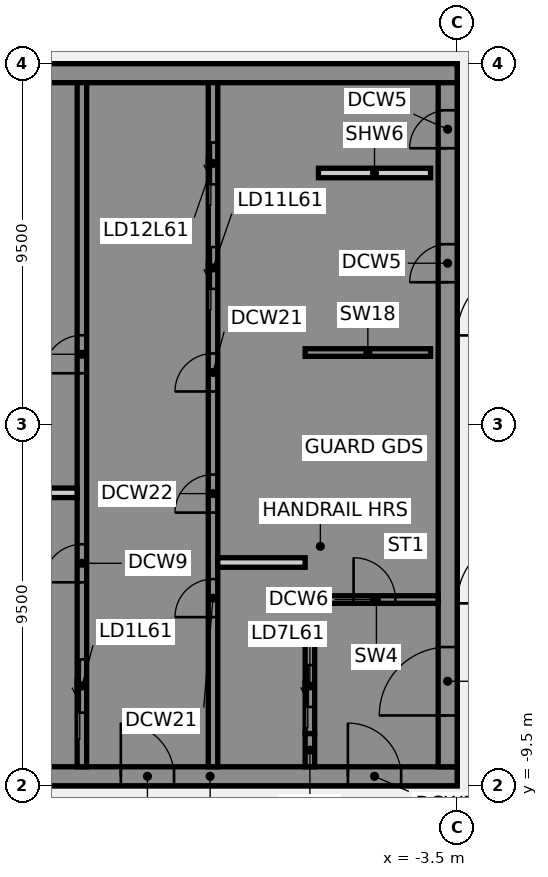
"""IFC4 building model, lengths in metres.
Left out: names, types, materials, properties, quantities, classifications, styles, units other than length and angle.
Written with IfcOpenShell. Run it as: python <this file> out.ifc"""

import sys

from ifc_helpers import new_model, si_unit, direction, frame, frame_2d, origin, place, context, subcontext, project, spatial, polyline, rectangle, outline, extrude, element, fill, save


model = new_model("IFC4")
c1 = context("Model", 3, precision=1e-05, world=origin(), true_north=direction((0.0, 1.0)))
c2 = subcontext(c1, "Body", "Model", "MODEL_VIEW")
j1 = project(units=[si_unit("LENGTHUNIT", "METRE"), si_unit("PLANEANGLEUNIT", "RADIAN")], contexts=[c1])
p1 = place(None, origin())
s1 = spatial("IfcSite", under=j1, at=p1, CompositionType="ELEMENT")
p2 = place(p1, origin())
s2 = spatial("IfcBuilding", under=s1, at=p2, CompositionType="ELEMENT")
p3 = place(p2, frame((0.0, 0.0, 241.5)))
s3 = spatial("IfcBuildingStorey", under=s2, at=p3, CompositionType="ELEMENT", Elevation=241.5)
p4 = place(p3, frame((-16.5, -9.25, 0.0), z_axis=(0.0, 0.0, 1.0), x_axis=(1.0, 0.0, 0.0)))
e1 = element("IfcWall", 1, at=p4, inside=s3, PredefinedType="SHEAR", context=c2, shape_type="SweptSolid", body=[
    extrude(rectangle(XDim=13.0, YDim=0.5, at=frame_2d((6.5, 0.0))), origin(), (0.0, 0.0, 1.0), 3.46),
])
p5 = place(p4, frame((4.15, 0.0, 0.0)))
e2 = element("IfcOpeningElement", 2, at=p5, cuts=e1, PredefinedType="OPENING", context=c2, shape_type="SweptSolid", body=[
    extrude(rectangle(XDim=1.4, YDim=2.1, at=frame_2d((0.7, 1.05))), frame((0.0, 0.26, 0.0), z_axis=(0.0, -1.0, 0.0), x_axis=(1.0, 0.0, 0.0)), (0.0, 0.0, 1.0), 0.52),
])
p6 = place(p4, frame((10.125, 0.0, 0.0)))
e3 = element("IfcOpeningElement", 3, at=p6, cuts=e1, PredefinedType="OPENING", context=c2, shape_type="SweptSolid", body=[
    extrude(rectangle(XDim=1.4, YDim=2.1, at=frame_2d((0.7, 1.05))), frame((0.0, 0.26, 0.0), z_axis=(0.0, -1.0, 0.0), x_axis=(1.0, 0.0, 0.0)), (0.0, 0.0, 1.0), 0.52),
])
p7 = place(p3, origin())
e4 = element("IfcWall", 4, at=p7, inside=s3, PredefinedType="SHEAR", context=c2, shape_type="SweptSolid", body=[
    extrude(outline(polyline([(-13.5, -8.125), (-16.0, -8.125), (-16.0, -5.625), (-13.5, -5.625), (-13.5, -5.375), (-16.0, -5.375), (-16.0, 5.375), (-13.5, 5.375), (-13.5, 5.625), (-16.0, 5.625), (-16.0, 8.125), (-13.5, 8.125), (-13.5, 9.0), (-16.0, 9.0), (-16.5, 9.0), (-16.5, -9.0), (-16.0, -9.0), (-13.5, -9.0), (-13.5, -8.125)])), origin(), (0.0, 0.0, 1.0), 3.46),
])
p8 = place(p3, frame((-16.5, 9.25, 0.0), z_axis=(0.0, 0.0, 1.0), x_axis=(1.0, 0.0, 0.0)))
e5 = element("IfcWall", 5, at=p8, inside=s3, PredefinedType="SHEAR", context=c2, shape_type="SweptSolid", body=[
    extrude(rectangle(XDim=13.0, YDim=0.5, at=frame_2d((6.5, 0.0))), origin(), (0.0, 0.0, 1.0), 3.46),
])
p9 = place(p3, origin())
e6 = element("IfcWall", 6, at=p9, inside=s3, PredefinedType="SHEAR", context=c2, shape_type="SweptSolid", body=[
    extrude(outline(polyline([(-9.8, -5.375), (-9.8, -5.625), (-7.5, -5.625), (-7.25, -5.625), (-7.25, 9.0), (-7.5, 9.0), (-9.8, 9.0), (-9.8, 8.125), (-7.5, 8.125), (-7.5, 5.625), (-9.8, 5.625), (-9.8, 5.375), (-7.5, 5.375), (-7.5, 2.875), (-9.8, 2.875), (-9.8, 2.625), (-7.5, 2.625), (-7.5, -5.375), (-9.8, -5.375)])), origin(), (0.0, 0.0, 1.0), 3.46),
])
p10 = place(p3, origin())
e7 = element("IfcWall", 7, at=p10, inside=s3, PredefinedType="SHEAR", context=c2, shape_type="SweptSolid", body=[
    extrude(outline(polyline([(-7.5, -8.125), (-9.55, -8.125), (-9.55, -5.625), (-9.8, -5.625), (-9.8, -8.125), (-9.8, -9.0), (-7.5, -9.0), (-7.5, -8.125)])), origin(), (0.0, 0.0, 1.0), 3.46),
])
p11 = place(p3, frame((-7.375, -9.0, 0.0), z_axis=(0.0, 0.0, 1.0), x_axis=(0.0, 1.0, 0.0)))
e8 = element("IfcWall", 8, at=p11, inside=s3, PredefinedType="SHEAR", context=c2, shape_type="SweptSolid", body=[
    extrude(rectangle(XDim=0.875, YDim=0.25, at=frame_2d((0.438, 0.0))), origin(), (0.0, 0.0, 1.0), 3.46),
])
p12 = place(p3, frame((-7.5, 1.9, 0.0), z_axis=(0.0, 0.0, 1.0), x_axis=(1.0, 0.0, 0.0)))
e9 = element("IfcWall", 9, at=p12, inside=s3, PredefinedType="SHEAR", context=c2, shape_type="SweptSolid", body=[
    extrude(rectangle(XDim=3.3, YDim=0.2, at=frame_2d((1.65, 0.0))), origin(), (0.0, 0.0, 1.0), 3.46),
])
p13 = place(p3, frame((-13.375, -9.0, 0.0), z_axis=(0.0, 0.0, 1.0), x_axis=(0.0, 1.0, 0.0)))
e10 = element("IfcWall", 10, at=p13, inside=s3, PredefinedType="SHEAR", context=c2, shape_type="SweptSolid", body=[
    extrude(rectangle(XDim=18.0, YDim=0.25, at=frame_2d((9.0, 0.0))), origin(), (0.0, 0.0, 1.0), 3.46),
])
p14 = place(p13, frame((1.425, 0.0, 0.0)))
e11 = element("IfcOpeningElement", 11, at=p14, cuts=e10, PredefinedType="OPENING", context=c2, shape_type="SweptSolid", body=[
    extrude(rectangle(XDim=1.4, YDim=2.1, at=frame_2d((0.7, 1.05))), frame((0.0, 0.135, 0.0), z_axis=(0.0, -1.0, 0.0), x_axis=(1.0, 0.0, 0.0)), (0.0, 0.0, 1.0), 0.27),
])
p15 = place(p13, frame((4.854, 0.0, 0.0)))
e12 = element("IfcOpeningElement", 12, at=p15, cuts=e10, PredefinedType="OPENING", context=c2, shape_type="SweptSolid", body=[
    extrude(rectangle(XDim=1.0, YDim=2.1, at=frame_2d((0.5, 1.05))), frame((0.0, 0.135, 0.0), z_axis=(0.0, -1.0, 0.0), x_axis=(1.0, 0.0, 0.0)), (0.0, 0.0, 1.0), 0.27),
])
p16 = place(p13, frame((10.354, 0.0, 0.0)))
e13 = element("IfcOpeningElement", 13, at=p16, cuts=e10, PredefinedType="OPENING", context=c2, shape_type="SweptSolid", body=[
    extrude(rectangle(XDim=1.0, YDim=2.1, at=frame_2d((0.5, 1.05))), frame((0.0, 0.135, 0.0), z_axis=(0.0, -1.0, 0.0), x_axis=(1.0, 0.0, 0.0)), (0.0, 0.0, 1.0), 0.27),
])
p17 = place(p3, frame((-9.925, -9.0, 0.0), z_axis=(0.0, 0.0, 1.0), x_axis=(0.0, 1.0, 0.0)))
e14 = element("IfcWall", 14, at=p17, inside=s3, PredefinedType="SHEAR", context=c2, shape_type="SweptSolid", body=[
    extrude(rectangle(XDim=18.0, YDim=0.25, at=frame_2d((9.0, 0.0))), origin(), (0.0, 0.0, 1.0), 3.46),
])
p18 = place(p17, frame((12.575, 0.0, 0.0)))
e15 = element("IfcOpeningElement", 15, at=p18, cuts=e14, PredefinedType="OPENING", context=c2, shape_type="SweptSolid", body=[
    extrude(rectangle(XDim=1.1, YDim=2.1, at=frame_2d((0.55, 1.05))), frame((0.0, 0.135, 0.0), z_axis=(0.0, -1.0, 0.0), x_axis=(1.0, 0.0, 0.0)), (0.0, 0.0, 1.0), 0.27),
])
p19 = place(p17, frame((15.325, 0.0, 0.0)))
e16 = element("IfcOpeningElement", 16, at=p19, cuts=e14, PredefinedType="OPENING", context=c2, shape_type="SweptSolid", body=[
    extrude(rectangle(XDim=1.1, YDim=2.1, at=frame_2d((0.55, 1.05))), frame((0.0, 0.135, 0.0), z_axis=(0.0, -1.0, 0.0), x_axis=(1.0, 0.0, 0.0)), (0.0, 0.0, 1.0), 0.27),
])
p20 = place(p17, frame((3.938, 0.0, 0.0)))
e17 = element("IfcOpeningElement", 17, at=p20, cuts=e14, PredefinedType="OPENING", context=c2, shape_type="SweptSolid", body=[
    extrude(rectangle(XDim=1.0, YDim=2.1, at=frame_2d((0.5, 1.05))), frame((0.0, 0.135, 0.0), z_axis=(0.0, -1.0, 0.0), x_axis=(1.0, 0.0, 0.0)), (0.0, 0.0, 1.0), 0.27),
])
p21 = place(p17, frame((6.688, 0.0, 0.0)))
e18 = element("IfcOpeningElement", 18, at=p21, cuts=e14, PredefinedType="OPENING", context=c2, shape_type="SweptSolid", body=[
    extrude(rectangle(XDim=1.0, YDim=2.1, at=frame_2d((0.5, 1.05))), frame((0.0, 0.135, 0.0), z_axis=(0.0, -1.0, 0.0), x_axis=(1.0, 0.0, 0.0)), (0.0, 0.0, 1.0), 0.27),
])
p22 = place(p17, frame((9.875, 0.0, 0.0)))
e19 = element("IfcOpeningElement", 19, at=p22, cuts=e14, PredefinedType="OPENING", context=c2, shape_type="SweptSolid", body=[
    extrude(rectangle(XDim=1.0, YDim=2.1, at=frame_2d((0.5, 1.05))), frame((0.0, 0.135, 0.0), z_axis=(0.0, -1.0, 0.0), x_axis=(1.0, 0.0, 0.0)), (0.0, 0.0, 1.0), 0.27),
])
p23 = place(p3, frame((-7.375, -8.125, 0.0), z_axis=(0.0, 0.0, 1.0), x_axis=(0.0, 1.0, 0.0)))
e20 = element("IfcWall", 20, at=p23, inside=s3, PredefinedType="SHEAR", context=c2, shape_type="SweptSolid", body=[
    extrude(rectangle(XDim=2.5, YDim=0.25, at=frame_2d((1.25, 0.0))), origin(), (0.0, 0.0, 1.0), 3.46),
])
p24 = place(p23, frame((0.7, 0.0, 0.0)))
e21 = element("IfcOpeningElement", 21, at=p24, cuts=e20, PredefinedType="OPENING", context=c2, shape_type="SweptSolid", body=[
    extrude(rectangle(XDim=1.1, YDim=2.1, at=frame_2d((0.55, 1.05))), frame((0.0, 0.135, 0.0), z_axis=(0.0, -1.0, 0.0), x_axis=(1.0, 0.0, 0.0)), (0.0, 0.0, 1.0), 0.27),
])
p25 = place(p3, frame((-3.75, -9.0, 0.0), z_axis=(0.0, 0.0, 1.0), x_axis=(0.0, 1.0, 0.0)))
e22 = element("IfcWall", 22, at=p25, inside=s3, PredefinedType="SHEAR", context=c2, shape_type="SweptSolid", body=[
    extrude(rectangle(XDim=18.0, YDim=0.5, at=frame_2d((9.0, 0.0))), origin(), (0.0, 0.0, 1.0), 3.46),
])
p26 = place(p25, frame((1.35, 0.0, 0.0)))
e23 = element("IfcOpeningElement", 23, at=p26, cuts=e22, PredefinedType="OPENING", context=c2, shape_type="SweptSolid", body=[
    extrude(rectangle(XDim=1.8, YDim=2.1, at=frame_2d((0.9, 1.05))), frame((0.0, 0.26, 0.0), z_axis=(0.0, -1.0, 0.0), x_axis=(1.0, 0.0, 0.0)), (0.0, 0.0, 1.0), 0.52),
])
p27 = place(p25, frame((12.75, 0.0, 0.0)))
e24 = element("IfcOpeningElement", 24, at=p27, cuts=e22, PredefinedType="OPENING", context=c2, shape_type="SweptSolid", body=[
    extrude(rectangle(XDim=1.0, YDim=2.1, at=frame_2d((0.5, 1.05))), frame((0.0, 0.26, 0.0), z_axis=(0.0, -1.0, 0.0), x_axis=(1.0, 0.0, 0.0)), (0.0, 0.0, 1.0), 0.52),
])
p28 = place(p25, frame((16.274, 0.0, 0.0)))
e25 = element("IfcOpeningElement", 25, at=p28, cuts=e22, PredefinedType="OPENING", context=c2, shape_type="SweptSolid", body=[
    extrude(rectangle(XDim=1.0, YDim=2.1, at=frame_2d((0.5, 1.05))), frame((0.0, 0.26, 0.0), z_axis=(0.0, -1.0, 0.0), x_axis=(1.0, 0.0, 0.0)), (0.0, 0.0, 1.0), 0.52),
])
p29 = place(p3, frame((-7.15, 6.624, 0.0), z_axis=(0.0, 0.0, 1.0), x_axis=(1.0, 0.0, 0.0)))
e26 = element("IfcWall", 26, at=p29, inside=s3, PredefinedType="PARTITIONING", context=c2, shape_type="SweptSolid", body=[
    extrude(rectangle(XDim=2.95, YDim=0.25, at=frame_2d((1.475, 0.0))), origin(), (0.0, 0.0, 1.0), 3.46),
])
p30 = place(p3, frame((-7.25, -4.6, 0.0), z_axis=(0.0, 0.0, 1.0), x_axis=(1.0, 0.0, 0.0)))
e27 = element("IfcWall", 27, at=p30, inside=s3, PredefinedType="SHEAR", context=c2, shape_type="SweptSolid", body=[
    extrude(rectangle(XDim=3.25, YDim=0.2, at=frame_2d((1.625, 0.0))), origin(), (0.0, 0.0, 1.0), 3.46),
])
p31 = place(p30, frame((1.025, 0.0, 0.0)))
e28 = element("IfcOpeningElement", 28, at=p31, cuts=e27, PredefinedType="OPENING", context=c2, shape_type="SweptSolid", body=[
    extrude(rectangle(XDim=1.1, YDim=2.1, at=frame_2d((0.55, 1.05))), frame((0.0, 0.11, 0.0), z_axis=(0.0, -1.0, 0.0), x_axis=(1.0, 0.0, 0.0)), (0.0, 0.0, 1.0), 0.22),
])
for number, where, z_axis, x_axis in (
    (29, (-15.8, -1.792, 0.0), (0.0, 0.0, 1.0), (1.0, 0.0, 0.0)),
    (30, (-9.8, -3.625, 0.0), (0.0, 0.0, 1.0), (1.0, 0.0, 0.0)),
):
    element("IfcWall", number, at=place(p3, frame(where, z_axis=z_axis, x_axis=x_axis)), inside=s3, PredefinedType="PARTITIONING", context=c2, shape_type="SweptSolid", body=[
        extrude(rectangle(XDim=2.3, YDim=0.25, at=frame_2d((1.15, 0.0))), origin(), (0.0, 0.0, 1.0), 3.46),
    ])
p32 = place(p5, origin())
e31 = element("IfcDoor", 31, at=p32, inside=s3, OperationType="SINGLE_SWING_LEFT", PredefinedType="DOOR", context=c2, shape_type="SweptSolid", body=[
    extrude(rectangle(XDim=1.4, YDim=2.1, at=frame_2d((0.7, 1.05))), frame((0.0, 0.025, 0.0), z_axis=(0.0, -1.0, 0.0), x_axis=(1.0, 0.0, 0.0)), (0.0, 0.0, 1.0), 0.05),
])
fill(e2, e31)
p33 = place(p6, origin())
e32 = element("IfcDoor", 32, at=p33, inside=s3, OperationType="SINGLE_SWING_LEFT", PredefinedType="DOOR", context=c2, shape_type="SweptSolid", body=[
    extrude(rectangle(XDim=1.4, YDim=2.1, at=frame_2d((0.7, 1.05))), frame((0.0, 0.025, 0.0), z_axis=(0.0, -1.0, 0.0), x_axis=(1.0, 0.0, 0.0)), (0.0, 0.0, 1.0), 0.05),
])
fill(e3, e32)
p34 = place(p26, origin())
e33 = element("IfcDoor", 33, at=p34, inside=s3, OperationType="SINGLE_SWING_LEFT", PredefinedType="DOOR", context=c2, shape_type="SweptSolid", body=[
    extrude(rectangle(XDim=1.8, YDim=2.1, at=frame_2d((0.9, 1.05))), frame((0.0, 0.025, 0.0), z_axis=(0.0, -1.0, 0.0), x_axis=(1.0, 0.0, 0.0)), (0.0, 0.0, 1.0), 0.05),
])
fill(e23, e33)
p35 = place(p27, origin())
e34 = element("IfcDoor", 34, at=p35, inside=s3, OperationType="SINGLE_SWING_LEFT", PredefinedType="DOOR", context=c2, shape_type="SweptSolid", body=[
    extrude(rectangle(XDim=1.0, YDim=2.1, at=frame_2d((0.5, 1.05))), frame((0.0, 0.225, 0.0), z_axis=(0.0, -1.0, 0.0), x_axis=(1.0, 0.0, 0.0)), (0.0, 0.0, 1.0), 0.05),
])
fill(e24, e34)
p36 = place(p28, origin())
e35 = element("IfcDoor", 35, at=p36, inside=s3, OperationType="SINGLE_SWING_LEFT", PredefinedType="DOOR", context=c2, shape_type="SweptSolid", body=[
    extrude(rectangle(XDim=1.0, YDim=2.1, at=frame_2d((0.5, 1.05))), frame((0.0, 0.225, 0.0), z_axis=(0.0, -1.0, 0.0), x_axis=(1.0, 0.0, 0.0)), (0.0, 0.0, 1.0), 0.05),
])
fill(e25, e35)
p37 = place(p31, origin())
e36 = element("IfcDoor", 36, at=p37, inside=s3, OperationType="SINGLE_SWING_LEFT", PredefinedType="DOOR", context=c2, shape_type="SweptSolid", body=[
    extrude(rectangle(XDim=1.1, YDim=2.1, at=frame_2d((0.55, 1.05))), frame((0.0, 0.025, 0.0), z_axis=(0.0, -1.0, 0.0), x_axis=(1.0, 0.0, 0.0)), (0.0, 0.0, 1.0), 0.05),
])
fill(e28, e36)
p38 = place(p14, origin())
e37 = element("IfcDoor", 37, at=p38, inside=s3, OperationType="SLIDING_TO_LEFT", PredefinedType="DOOR", context=c2, shape_type="SweptSolid", body=[
    extrude(rectangle(XDim=1.4, YDim=2.1, at=frame_2d((0.7, 1.05))), frame((0.0, 0.025, 0.0), z_axis=(0.0, -1.0, 0.0), x_axis=(1.0, 0.0, 0.0)), (0.0, 0.0, 1.0), 0.05),
])
fill(e11, e37)
p39 = place(p24, origin())
e38 = element("IfcDoor", 38, at=p39, inside=s3, OperationType="SLIDING_TO_LEFT", PredefinedType="DOOR", context=c2, shape_type="SweptSolid", body=[
    extrude(rectangle(XDim=1.1, YDim=2.1, at=frame_2d((0.55, 1.05))), frame((0.0, 0.025, 0.0), z_axis=(0.0, -1.0, 0.0), x_axis=(1.0, 0.0, 0.0)), (0.0, 0.0, 1.0), 0.05),
])
fill(e21, e38)
p40 = place(p18, origin())
e39 = element("IfcDoor", 39, at=p40, inside=s3, OperationType="SLIDING_TO_LEFT", PredefinedType="DOOR", context=c2, shape_type="SweptSolid", body=[
    extrude(rectangle(XDim=1.1, YDim=2.1, at=frame_2d((0.55, 1.05))), frame((0.0, 0.025, 0.0), z_axis=(0.0, -1.0, 0.0), x_axis=(1.0, 0.0, 0.0)), (0.0, 0.0, 1.0), 0.05),
])
fill(e15, e39)
p41 = place(p19, origin())
e40 = element("IfcDoor", 40, at=p41, inside=s3, OperationType="SLIDING_TO_LEFT", PredefinedType="DOOR", context=c2, shape_type="SweptSolid", body=[
    extrude(rectangle(XDim=1.1, YDim=2.1, at=frame_2d((0.55, 1.05))), frame((0.0, 0.025, 0.0), z_axis=(0.0, -1.0, 0.0), x_axis=(1.0, 0.0, 0.0)), (0.0, 0.0, 1.0), 0.05),
])
fill(e16, e40)
p42 = place(p15, origin())
e41 = element("IfcDoor", 41, at=p42, inside=s3, OperationType="SINGLE_SWING_LEFT", PredefinedType="DOOR", context=c2, shape_type="SweptSolid", body=[
    extrude(rectangle(XDim=1.0, YDim=2.1, at=frame_2d((0.5, 1.05))), frame((0.0, 0.025, 0.0), z_axis=(0.0, -1.0, 0.0), x_axis=(1.0, 0.0, 0.0)), (0.0, 0.0, 1.0), 0.05),
])
fill(e12, e41)
p43 = place(p16, origin())
e42 = element("IfcDoor", 42, at=p43, inside=s3, OperationType="SINGLE_SWING_LEFT", PredefinedType="DOOR", context=c2, shape_type="SweptSolid", body=[
    extrude(rectangle(XDim=1.0, YDim=2.1, at=frame_2d((0.5, 1.05))), frame((0.0, 0.025, 0.0), z_axis=(0.0, -1.0, 0.0), x_axis=(1.0, 0.0, 0.0)), (0.0, 0.0, 1.0), 0.05),
])
fill(e13, e42)
p44 = place(p20, origin())
e43 = element("IfcDoor", 43, at=p44, inside=s3, OperationType="SINGLE_SWING_LEFT", PredefinedType="DOOR", context=c2, shape_type="SweptSolid", body=[
    extrude(rectangle(XDim=1.0, YDim=2.1, at=frame_2d((0.5, 1.05))), frame((0.0, 0.025, 0.0), z_axis=(0.0, -1.0, 0.0), x_axis=(1.0, 0.0, 0.0)), (0.0, 0.0, 1.0), 0.05),
])
fill(e17, e43)
p45 = place(p21, origin())
e44 = element("IfcDoor", 44, at=p45, inside=s3, OperationType="SINGLE_SWING_LEFT", PredefinedType="DOOR", context=c2, shape_type="SweptSolid", body=[
    extrude(rectangle(XDim=1.0, YDim=2.1, at=frame_2d((0.5, 1.05))), frame((0.0, 0.025, 0.0), z_axis=(0.0, -1.0, 0.0), x_axis=(1.0, 0.0, 0.0)), (0.0, 0.0, 1.0), 0.05),
])
fill(e18, e44)
p46 = place(p22, origin())
e45 = element("IfcDoor", 45, at=p46, inside=s3, OperationType="SINGLE_SWING_LEFT", PredefinedType="DOOR", context=c2, shape_type="SweptSolid", body=[
    extrude(rectangle(XDim=1.0, YDim=2.1, at=frame_2d((0.5, 1.05))), frame((0.0, 0.025, 0.0), z_axis=(0.0, -1.0, 0.0), x_axis=(1.0, 0.0, 0.0)), (0.0, 0.0, 1.0), 0.05),
])
fill(e19, e45)
save(model, sys.argv[1])
